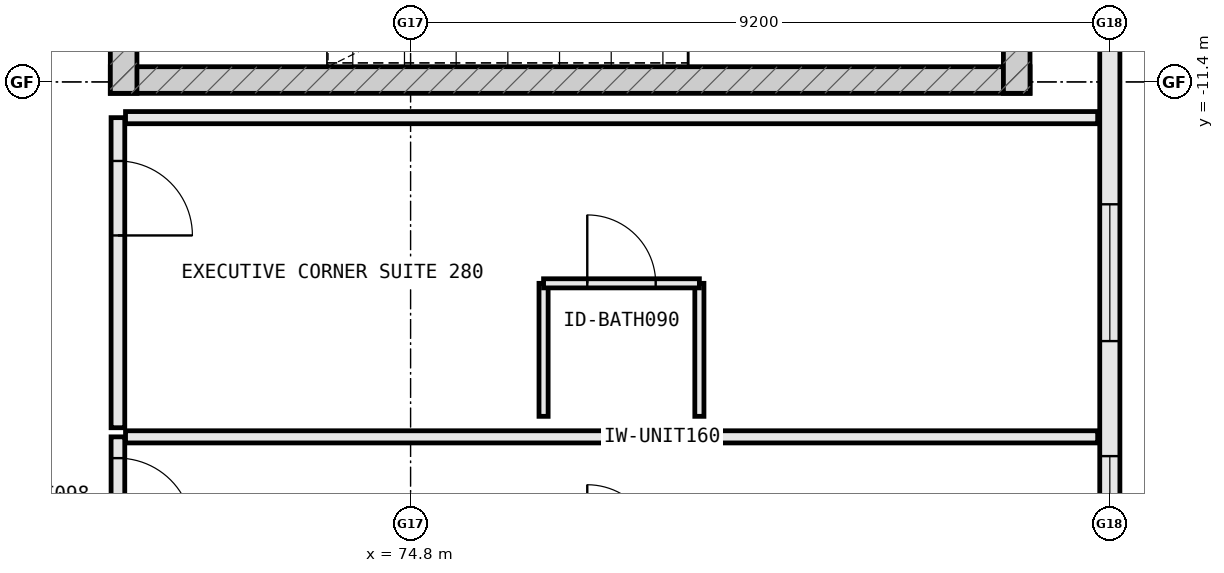
"""IFC4 building model, lengths in metres.
Left out: names, types, materials, properties, quantities, classifications, styles, units other than length and angle.
Written with IfcOpenShell. Run it as: python <this file> out.ifc"""

import sys

from ifc_helpers import new_model, si_unit, direction, frame, frame_2d, origin, place, context, subcontext, project, spatial, rectangle, extrude, element, fill, save


model = new_model("IFC4")
c1 = context("Model", 3, precision=1e-05, world=origin(), true_north=direction((0.0, 1.0)))
c2 = subcontext(c1, "Body", "Model", "MODEL_VIEW")
j1 = project(units=[si_unit("LENGTHUNIT", "METRE"), si_unit("PLANEANGLEUNIT", "RADIAN")], contexts=[c1])
p1 = place(None, origin())
s1 = spatial("IfcSite", under=j1, at=p1, CompositionType="ELEMENT")
p2 = place(p1, origin())
s2 = spatial("IfcBuilding", under=s1, at=p2, CompositionType="ELEMENT")
p3 = place(p2, frame((0.0, 0.0, 42.8)))
s3 = spatial("IfcBuildingStorey", under=s2, at=p3, CompositionType="ELEMENT", Elevation=42.8)
p4 = place(p3, frame((84.0, -18.377, 0.0), z_axis=(0.0, 0.0, 1.0), x_axis=(0.0, 1.0, 0.0)))
e1 = element("IfcWall", 1, at=p4, inside=s3, PredefinedType="STANDARD", context=c2, shape_type="SweptSolid", body=[
    extrude(rectangle(XDim=9.154, YDim=0.265, at=frame_2d((4.577, 0.0))), origin(), (0.0, 0.0, 1.0), 2.955),
])
p5 = place(p4, frame((0.253, 0.0, 0.85)))
e2 = element("IfcOpeningElement", 2, at=p5, cuts=e1, PredefinedType="OPENING", context=c2, shape_type="SweptSolid", body=[
    extrude(rectangle(XDim=1.8, YDim=1.85, at=frame_2d((0.9, 0.925))), frame((0.0, 0.145, 0.0), z_axis=(0.0, -1.0, 0.0), x_axis=(1.0, 0.0, 0.0)), (0.0, 0.0, 1.0), 0.289),
])
p6 = place(p4, frame((3.567, 0.0, 0.85)))
e3 = element("IfcOpeningElement", 3, at=p6, cuts=e1, PredefinedType="OPENING", context=c2, shape_type="SweptSolid", body=[
    extrude(rectangle(XDim=1.8, YDim=1.85, at=frame_2d((0.9, 0.925))), frame((0.0, 0.145, 0.0), z_axis=(0.0, -1.0, 0.0), x_axis=(1.0, 0.0, 0.0)), (0.0, 0.0, 1.0), 0.289),
])
p7 = place(p3, frame((70.85, -11.375, 0.0), z_axis=(0.0, 0.0, 1.0), x_axis=(1.0, 0.0, 0.0)))
e4 = element("IfcWall", 4, at=p7, inside=s3, PredefinedType="SHEAR", context=c2, shape_type="SweptSolid", body=[
    extrude(rectangle(XDim=12.1, YDim=0.35, at=frame_2d((6.05, 0.0))), origin(), (0.0, 0.0, 1.0), 3.8),
])
p8 = place(p3, frame((82.775, -11.55, 0.0), z_axis=(0.0, 0.0, 1.0), x_axis=(0.0, 1.0, 0.0)))
e5 = element("IfcWall", 5, at=p8, inside=s3, PredefinedType="SHEAR", context=c2, shape_type="SweptSolid", body=[
    extrude(rectangle(XDim=5.1, YDim=0.35, at=frame_2d((2.55, 0.0))), origin(), (0.0, 0.0, 1.0), 3.8),
])
p9 = place(p3, frame((71.025, -6.45, 0.0), z_axis=(0.0, 0.0, 1.0), x_axis=(0.0, -1.0, 0.0)))
e6 = element("IfcWall", 6, at=p9, inside=s3, PredefinedType="SHEAR", context=c2, shape_type="SweptSolid", body=[
    extrude(rectangle(XDim=5.1, YDim=0.35, at=frame_2d((2.55, 0.0))), origin(), (0.0, 0.0, 1.0), 3.8),
])
p10 = place(p9, frame((2.0, 0.0, 0.0)))
e7 = element("IfcOpeningElement", 7, at=p10, cuts=e6, PredefinedType="OPENING", context=c2, shape_type="SweptSolid", body=[
    extrude(rectangle(XDim=1.1, YDim=2.2, at=frame_2d((0.55, 1.1))), frame((0.0, 0.187, 0.0), z_axis=(0.0, -1.0, 0.0), x_axis=(1.0, 0.0, 0.0)), (0.0, 0.0, 1.0), 0.374),
])
p11 = place(p3, frame((70.95, -16.07, 0.0), z_axis=(0.0, 0.0, 1.0), x_axis=(0.0, -1.0, 0.0)))
e8 = element("IfcWall", 8, at=p11, inside=s3, PredefinedType="PARTITIONING", context=c2, shape_type="SweptSolid", body=[
    extrude(rectangle(XDim=3.43, YDim=0.18, at=frame_2d((1.715, 0.0))), origin(), (0.0, 0.0, 1.0), 3.54),
])
p12 = place(p11, frame((0.28, 0.0, 0.0)))
e9 = element("IfcOpeningElement", 9, at=p12, cuts=e8, PredefinedType="OPENING", context=c2, shape_type="SweptSolid", body=[
    extrude(rectangle(XDim=0.98, YDim=2.18, at=frame_2d((0.49, 1.09))), frame((0.0, 0.102, 0.0), z_axis=(0.0, -1.0, 0.0), x_axis=(1.0, 0.0, 0.0)), (0.0, 0.0, 1.0), 0.204),
])
p13 = place(p3, frame((71.05, -16.07, 0.0), z_axis=(0.0, 0.0, 1.0), x_axis=(1.0, 0.0, 0.0)))
e10 = element("IfcWall", 10, at=p13, inside=s3, PredefinedType="PARTITIONING", context=c2, shape_type="SweptSolid", body=[
    extrude(rectangle(XDim=12.79, YDim=0.16, at=frame_2d((6.395, 0.0))), origin(), (0.0, 0.0, 1.0), 3.54),
])
p14 = place(p3, frame((70.95, -11.87, 0.0), z_axis=(0.0, 0.0, 1.0), x_axis=(0.0, -1.0, 0.0)))
e11 = element("IfcWall", 11, at=p14, inside=s3, PredefinedType="PARTITIONING", context=c2, shape_type="SweptSolid", body=[
    extrude(rectangle(XDim=4.08, YDim=0.18, at=frame_2d((2.04, 0.0))), origin(), (0.0, 0.0, 1.0), 3.54),
])
p15 = place(p14, frame((0.57, 0.0, 0.0)))
e12 = element("IfcOpeningElement", 12, at=p15, cuts=e11, PredefinedType="OPENING", context=c2, shape_type="SweptSolid", body=[
    extrude(rectangle(XDim=0.98, YDim=2.18, at=frame_2d((0.49, 1.09))), frame((0.0, 0.102, 0.0), z_axis=(0.0, -1.0, 0.0), x_axis=(1.0, 0.0, 0.0)), (0.0, 0.0, 1.0), 0.204),
])
p16 = place(p3, frame((71.05, -11.87, 0.0), z_axis=(0.0, 0.0, 1.0), x_axis=(1.0, 0.0, 0.0)))
e13 = element("IfcWall", 13, at=p16, inside=s3, PredefinedType="PARTITIONING", context=c2, shape_type="SweptSolid", body=[
    extrude(rectangle(XDim=12.79, YDim=0.16, at=frame_2d((6.395, 0.0))), origin(), (0.0, 0.0, 1.0), 3.54),
])
for number, where, z_axis, x_axis in (
    (14, (76.55, -15.8, 0.0), (0.0, 0.0, 1.0), (0.0, 1.0, 0.0)),
    (15, (78.6, -15.8, 0.0), (0.0, 0.0, 1.0), (0.0, 1.0, 0.0)),
):
    element("IfcWall", number, at=place(p3, frame(where, z_axis=z_axis, x_axis=x_axis)), inside=s3, PredefinedType="PARTITIONING", context=c2, shape_type="SweptSolid", body=[
        extrude(rectangle(XDim=1.75, YDim=0.12, at=frame_2d((0.875, 0.0))), origin(), (0.0, 0.0, 1.0), 3.54),
    ])
p17 = place(p3, frame((76.55, -14.05, 0.0), z_axis=(0.0, 0.0, 1.0), x_axis=(1.0, 0.0, 0.0)))
e16 = element("IfcWall", 16, at=p17, inside=s3, PredefinedType="PARTITIONING", context=c2, shape_type="SweptSolid", body=[
    extrude(rectangle(XDim=2.05, YDim=0.12, at=frame_2d((1.025, 0.0))), origin(), (0.0, 0.0, 1.0), 3.54),
])
p18 = place(p17, frame((0.575, 0.0, 0.0)))
e17 = element("IfcOpeningElement", 17, at=p18, cuts=e16, PredefinedType="OPENING", context=c2, shape_type="SweptSolid", body=[
    extrude(rectangle(XDim=0.9, YDim=2.15, at=frame_2d((0.45, 1.075))), frame((0.0, 0.072, 0.0), z_axis=(0.0, -1.0, 0.0), x_axis=(1.0, 0.0, 0.0)), (0.0, 0.0, 1.0), 0.144),
])
p19 = place(p5, origin())
e18 = element("IfcWindow", 18, at=p19, inside=s3, PartitioningType="SINGLE_PANEL", PredefinedType="WINDOW", context=c2, shape_type="SweptSolid", body=[
    extrude(rectangle(XDim=1.8, YDim=1.85, at=frame_2d((0.9, 0.925))), frame((0.0, 0.03, 0.0), z_axis=(0.0, -1.0, 0.0), x_axis=(1.0, 0.0, 0.0)), (0.0, 0.0, 1.0), 0.06),
])
fill(e2, e18)
p20 = place(p6, origin())
e19 = element("IfcWindow", 19, at=p20, inside=s3, PartitioningType="SINGLE_PANEL", PredefinedType="WINDOW", context=c2, shape_type="SweptSolid", body=[
    extrude(rectangle(XDim=1.8, YDim=1.85, at=frame_2d((0.9, 0.925))), frame((0.0, 0.03, 0.0), z_axis=(0.0, -1.0, 0.0), x_axis=(1.0, 0.0, 0.0)), (0.0, 0.0, 1.0), 0.06),
])
fill(e3, e19)
p21 = place(p12, origin())
e20 = element("IfcDoor", 20, at=p21, inside=s3, OperationType="SINGLE_SWING_RIGHT", PredefinedType="DOOR", context=c2, shape_type="SweptSolid", body=[
    extrude(rectangle(XDim=0.98, YDim=2.18, at=frame_2d((0.49, 1.09))), frame((0.0, 0.025, 0.0), z_axis=(0.0, -1.0, 0.0), x_axis=(1.0, 0.0, 0.0)), (0.0, 0.0, 1.0), 0.05),
])
fill(e9, e20)
p22 = place(p15, origin())
e21 = element("IfcDoor", 21, at=p22, inside=s3, OperationType="SINGLE_SWING_RIGHT", PredefinedType="DOOR", context=c2, shape_type="SweptSolid", body=[
    extrude(rectangle(XDim=0.98, YDim=2.18, at=frame_2d((0.49, 1.09))), frame((0.0, 0.025, 0.0), z_axis=(0.0, -1.0, 0.0), x_axis=(1.0, 0.0, 0.0)), (0.0, 0.0, 1.0), 0.05),
])
fill(e12, e21)
p23 = place(p18, origin())
e22 = element("IfcDoor", 22, at=p23, inside=s3, OperationType="SINGLE_SWING_LEFT", PredefinedType="DOOR", context=c2, shape_type="SweptSolid", body=[
    extrude(rectangle(XDim=0.9, YDim=2.15, at=frame_2d((0.45, 1.075))), frame((0.0, 0.025, 0.0), z_axis=(0.0, -1.0, 0.0), x_axis=(1.0, 0.0, 0.0)), (0.0, 0.0, 1.0), 0.05),
])
fill(e17, e22)
save(model, sys.argv[1])
